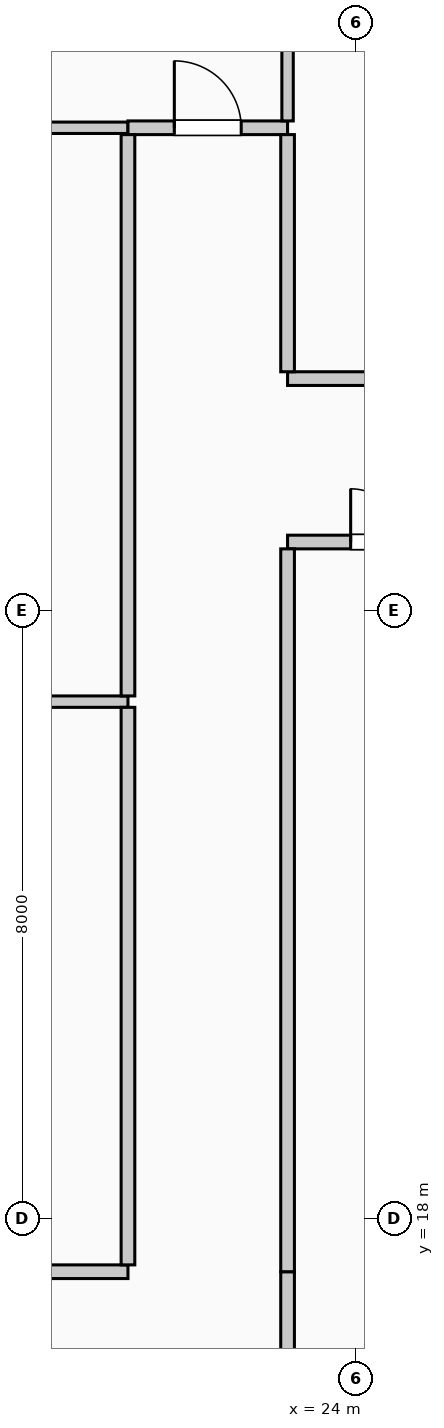
"""IFC4 building model, lengths in metres.
Left out: names, types, materials, properties, quantities, classifications, styles, units other than length and angle.
Written with IfcOpenShell. Run it as: python <this file> out.ifc"""

import sys

from ifc_helpers import new_model, si_unit, direction, frame, frame_2d, origin, place, context, subcontext, project, spatial, rectangle, extrude, element, fill, save


model = new_model("IFC4")
c1 = context("Model", 3, precision=1e-05, world=origin(), true_north=direction((0.0, 1.0)))
c2 = subcontext(c1, "Body", "Model", "MODEL_VIEW")
j1 = project(units=[si_unit("LENGTHUNIT", "METRE"), si_unit("PLANEANGLEUNIT", "RADIAN")], contexts=[c1])
p1 = place(None, origin())
s1 = spatial("IfcSite", under=j1, at=p1, CompositionType="ELEMENT")
p2 = place(p1, origin())
s2 = spatial("IfcBuilding", under=s1, at=p2, CompositionType="ELEMENT")
p3 = place(p2, frame((0.0, 0.0, 170.6)))
s3 = spatial("IfcBuildingStorey", under=s2, at=p3, CompositionType="ELEMENT", Elevation=170.6)
p4 = place(p3, frame((15.85, 17.3, 0.0), z_axis=(0.0, 0.0, 1.0), x_axis=(1.0, 0.0, 0.0)))
e1 = element("IfcWall", 1, at=p4, inside=s3, PredefinedType="PARTITIONING", context=c2, shape_type="SweptSolid", body=[
    extrude(rectangle(XDim=5.15, YDim=0.18, at=frame_2d((2.575, 0.0))), origin(), (0.0, 0.0, 1.0), 3.725),
])
p5 = place(p4, frame((2.415, 0.0, 0.0)))
e2 = element("IfcOpeningElement", 2, at=p5, cuts=e1, PredefinedType="OPENING", context=c2, shape_type="SweptSolid", body=[
    extrude(rectangle(XDim=1.4, YDim=2.2, at=frame_2d((0.7, 1.1))), frame((0.0, 0.1, 0.0), z_axis=(0.0, -1.0, 0.0), x_axis=(1.0, 0.0, 0.0)), (0.0, 0.0, 1.0), 0.2),
])
p6 = place(p3, frame((15.85, 24.8, 0.0), z_axis=(0.0, 0.0, 1.0), x_axis=(1.0, 0.0, 0.0)))
e3 = element("IfcWall", 3, at=p6, inside=s3, PredefinedType="PARTITIONING", context=c2, shape_type="SweptSolid", body=[
    extrude(rectangle(XDim=5.15, YDim=0.15, at=frame_2d((2.575, 0.0))), origin(), (0.0, 0.0, 1.0), 3.725),
])
p7 = place(p3, frame((23.1, 26.9, 0.0), z_axis=(0.0, 0.0, 1.0), x_axis=(1.0, 0.0, 0.0)))
e4 = element("IfcWall", 4, at=p7, inside=s3, PredefinedType="PARTITIONING", context=c2, shape_type="SweptSolid", body=[
    extrude(rectangle(XDim=3.06, YDim=0.18, at=frame_2d((1.53, 0.0))), origin(), (0.0, 0.0, 1.0), 3.725),
])
p8 = place(p7, frame((0.83, 0.0, 0.0)))
e5 = element("IfcOpeningElement", 5, at=p8, cuts=e4, PredefinedType="OPENING", context=c2, shape_type="SweptSolid", body=[
    extrude(rectangle(XDim=1.4, YDim=2.2, at=frame_2d((0.7, 1.1))), frame((0.0, 0.1, 0.0), z_axis=(0.0, -1.0, 0.0), x_axis=(1.0, 0.0, 0.0)), (0.0, 0.0, 1.0), 0.2),
])
p9 = place(p3, frame((23.1, 29.05, 0.0), z_axis=(0.0, 0.0, 1.0), x_axis=(1.0, 0.0, 0.0)))
e6 = element("IfcWall", 6, at=p9, inside=s3, PredefinedType="PARTITIONING", context=c2, shape_type="SweptSolid", body=[
    extrude(rectangle(XDim=7.13, YDim=0.18, at=frame_2d((3.565, 0.0))), origin(), (0.0, 0.0, 1.0), 3.725),
])
p10 = place(p9, frame((3.09, 0.0, 0.0)))
e7 = element("IfcOpeningElement", 7, at=p10, cuts=e6, PredefinedType="OPENING", context=c2, shape_type="SweptSolid", body=[
    extrude(rectangle(XDim=0.95, YDim=2.15, at=frame_2d((0.475, 1.075))), frame((0.0, 0.1, 0.0), z_axis=(0.0, -1.0, 0.0), x_axis=(1.0, 0.0, 0.0)), (0.0, 0.0, 1.0), 0.2),
])
p11 = place(p3, frame((16.75, 32.35, 0.0), z_axis=(0.0, 0.0, 1.0), x_axis=(1.0, 0.0, 0.0)))
e8 = element("IfcWall", 8, at=p11, inside=s3, PredefinedType="PARTITIONING", context=c2, shape_type="SweptSolid", body=[
    extrude(rectangle(XDim=4.25, YDim=0.15, at=frame_2d((2.125, 0.0))), origin(), (0.0, 0.0, 1.0), 3.725),
])
p12 = place(p3, frame((21.0, 32.35, 0.0), z_axis=(0.0, 0.0, 1.0), x_axis=(1.0, 0.0, 0.0)))
e9 = element("IfcWall", 9, at=p12, inside=s3, PredefinedType="PARTITIONING", context=c2, shape_type="SweptSolid", body=[
    extrude(rectangle(XDim=2.1, YDim=0.18, at=frame_2d((1.05, 0.0))), origin(), (0.0, 0.0, 1.0), 3.725),
])
p13 = place(p12, frame((0.61, 0.0, 0.0)))
e10 = element("IfcOpeningElement", 10, at=p13, cuts=e9, PredefinedType="OPENING", context=c2, shape_type="SweptSolid", body=[
    extrude(rectangle(XDim=0.88, YDim=2.1, at=frame_2d((0.44, 1.05))), frame((0.0, 0.1, 0.0), z_axis=(0.0, -1.0, 0.0), x_axis=(1.0, 0.0, 0.0)), (0.0, 0.0, 1.0), 0.2),
])
p14 = place(p3, frame((21.0, 17.39, 0.0), z_axis=(0.0, 0.0, 1.0), x_axis=(0.0, 1.0, 0.0)))
e11 = element("IfcWall", 11, at=p14, inside=s3, PredefinedType="PARTITIONING", context=c2, shape_type="SweptSolid", body=[
    extrude(rectangle(XDim=7.335, YDim=0.18, at=frame_2d((3.667, 0.0))), origin(), (0.0, 0.0, 1.0), 3.725),
])
p15 = place(p3, frame((21.0, 24.875, 0.0), z_axis=(0.0, 0.0, 1.0), x_axis=(0.0, 1.0, 0.0)))
e12 = element("IfcWall", 12, at=p15, inside=s3, PredefinedType="PARTITIONING", context=c2, shape_type="SweptSolid", body=[
    extrude(rectangle(XDim=7.385, YDim=0.18, at=frame_2d((3.692, 0.0))), origin(), (0.0, 0.0, 1.0), 3.725),
])
p16 = place(p3, frame((23.1, 15.29, 0.0), z_axis=(0.0, 0.0, 1.0), x_axis=(0.0, 1.0, 0.0)))
e13 = element("IfcWall", 13, at=p16, inside=s3, PredefinedType="PARTITIONING", context=c2, shape_type="SweptSolid", body=[
    extrude(rectangle(XDim=2.01, YDim=0.18, at=frame_2d((1.005, 0.0))), origin(), (0.0, 0.0, 1.0), 3.725),
])
p17 = place(p3, frame((23.1, 17.3, 0.0), z_axis=(0.0, 0.0, 1.0), x_axis=(0.0, 1.0, 0.0)))
e14 = element("IfcWall", 14, at=p17, inside=s3, PredefinedType="PARTITIONING", context=c2, shape_type="SweptSolid", body=[
    extrude(rectangle(XDim=9.51, YDim=0.18, at=frame_2d((4.755, 0.0))), origin(), (0.0, 0.0, 1.0), 3.725),
])
p18 = place(p3, frame((23.1, 29.14, 0.0), z_axis=(0.0, 0.0, 1.0), x_axis=(0.0, 1.0, 0.0)))
e15 = element("IfcWall", 15, at=p18, inside=s3, PredefinedType="PARTITIONING", context=c2, shape_type="SweptSolid", body=[
    extrude(rectangle(XDim=3.12, YDim=0.18, at=frame_2d((1.56, 0.0))), origin(), (0.0, 0.0, 1.0), 3.725),
])
p19 = place(p3, frame((23.1, 32.44, 0.0), z_axis=(0.0, 0.0, 1.0), x_axis=(0.0, 1.0, 0.0)))
e16 = element("IfcWall", 16, at=p19, inside=s3, PredefinedType="PARTITIONING", context=c2, shape_type="SweptSolid", body=[
    extrude(rectangle(XDim=12.84, YDim=0.15, at=frame_2d((6.42, 0.0))), origin(), (0.0, 0.0, 1.0), 3.725),
])
p20 = place(p8, origin())
e17 = element("IfcDoor", 17, at=p20, inside=s3, OperationType="DOUBLE_DOOR_SINGLE_SWING", PredefinedType="DOOR", context=c2, shape_type="SweptSolid", body=[
    extrude(rectangle(XDim=1.4, YDim=2.2, at=frame_2d((0.7, 1.1))), frame((0.0, 0.025, 0.0), z_axis=(0.0, -1.0, 0.0), x_axis=(1.0, 0.0, 0.0)), (0.0, 0.0, 1.0), 0.05),
])
fill(e5, e17)
p21 = place(p13, origin())
e18 = element("IfcDoor", 18, at=p21, inside=s3, OperationType="SINGLE_SWING_LEFT", PredefinedType="DOOR", context=c2, shape_type="SweptSolid", body=[
    extrude(rectangle(XDim=0.88, YDim=2.1, at=frame_2d((0.44, 1.05))), frame((0.0, 0.025, 0.0), z_axis=(0.0, -1.0, 0.0), x_axis=(1.0, 0.0, 0.0)), (0.0, 0.0, 1.0), 0.05),
])
fill(e10, e18)
save(model, sys.argv[1])
